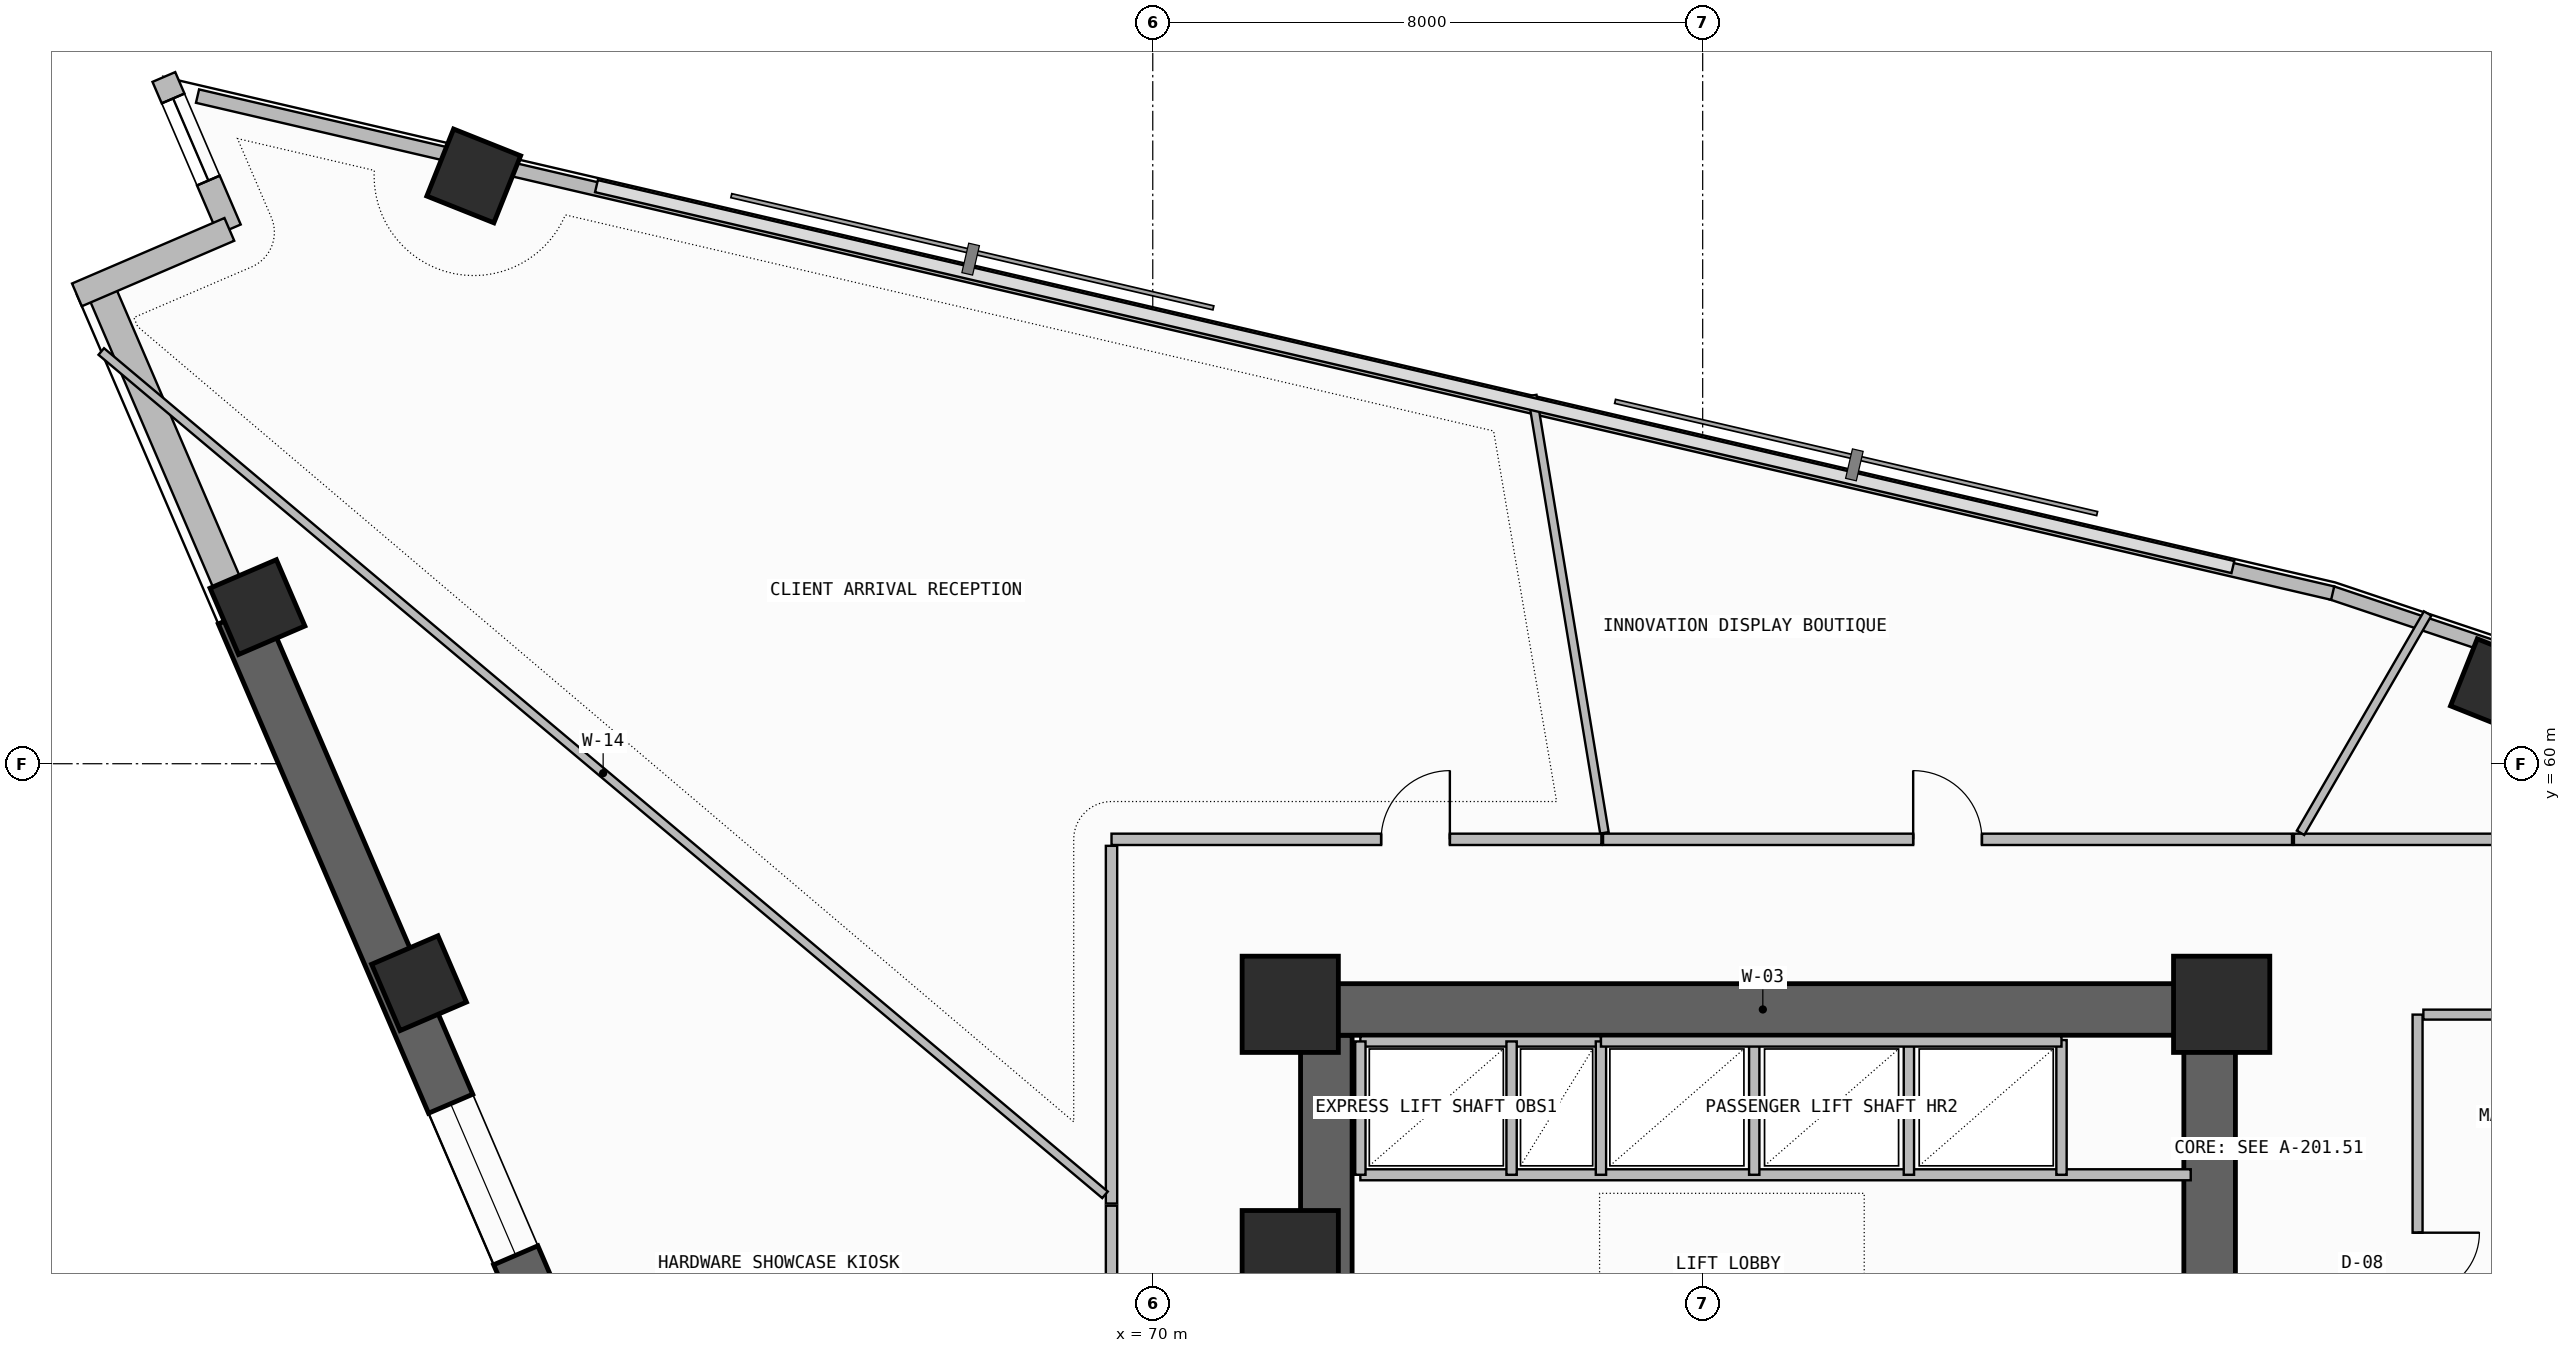
"""IFC4 building model, lengths in metres.
Left out: names, types, materials, properties, quantities, classifications, styles, units other than length and angle.
Written with IfcOpenShell. Run it as: python <this file> out.ifc"""

import sys

from ifc_helpers import new_model, si_unit, direction, frame, frame_2d, origin, origin_2d, place, context, subcontext, project, spatial, rectangle, extrude, element, fill, save


model = new_model("IFC4")
c1 = context("Model", 3, precision=1e-05, world=origin(), true_north=direction((0.0, 1.0)))
c2 = subcontext(c1, "Body", "Model", "MODEL_VIEW")
j1 = project(units=[si_unit("LENGTHUNIT", "METRE"), si_unit("PLANEANGLEUNIT", "RADIAN")], contexts=[c1])
p1 = place(None, origin())
s1 = spatial("IfcSite", under=j1, at=p1, CompositionType="ELEMENT")
p2 = place(p1, origin())
s2 = spatial("IfcBuilding", under=s1, at=p2, CompositionType="ELEMENT")
p3 = place(p2, frame((0.0, 0.0, 182.62)))
s3 = spatial("IfcBuildingStorey", under=s2, at=p3, CompositionType="ELEMENT", Elevation=182.62)
p4 = place(p3, frame((72.525, 43.35, -0.26), z_axis=(0.0, 0.0, 1.0), x_axis=(0.0, 1.0, 0.0)))
e1 = element("IfcWall", 1, at=p4, inside=s3, PredefinedType="SHEAR", context=c2, shape_type="SweptSolid", body=[
    extrude(rectangle(XDim=12.7, YDim=0.75, at=frame_2d((6.35, 0.0))), origin(), (0.0, 0.0, 1.0), 3.52),
])
p5 = place(p4, frame((1.35, 0.0, 0.26)))
e2 = element("IfcOpeningElement", 2, at=p5, cuts=e1, PredefinedType="OPENING", context=c2, shape_type="SweptSolid", body=[
    extrude(rectangle(XDim=1.2, YDim=2.2, at=frame_2d((0.6, 1.1))), frame((0.0, 0.385, 0.0), z_axis=(0.0, -1.0, 0.0), x_axis=(1.0, 0.0, 0.0)), (0.0, 0.0, 1.0), 0.77),
])
p6 = place(p3, frame((72.0, 56.425, -0.26), z_axis=(0.0, 0.0, 1.0), x_axis=(1.0, 0.0, 0.0)))
e3 = element("IfcWall", 3, at=p6, inside=s3, PredefinedType="SHEAR", context=c2, shape_type="SweptSolid", body=[
    extrude(rectangle(XDim=13.75, YDim=0.75, at=frame_2d((6.875, 0.0))), origin(), (0.0, 0.0, 1.0), 3.52),
])
p7 = place(p3, frame((85.375, 47.6, -0.26), z_axis=(0.0, 0.0, 1.0), x_axis=(0.0, 1.0, 0.0)))
e4 = element("IfcWall", 4, at=p7, inside=s3, PredefinedType="SHEAR", context=c2, shape_type="SweptSolid", body=[
    extrude(rectangle(XDim=8.45, YDim=0.75, at=frame_2d((4.225, 0.0))), origin(), (0.0, 0.0, 1.0), 3.52),
])
for number, where, z_axis, x_axis in (
    (5, (72.0, 52.8, 0.0), (0.0, 0.0, 1.0), (1.0, 0.0, 0.0)),
    (6, (72.0, 56.5, 0.0), (0.0, 0.0, 1.0), (1.0, 0.0, 0.0)),
    (7, (85.55, 56.5, 0.0), (0.0, 0.0, 1.0), (1.0, 0.0, 0.0)),
):
    element("IfcColumn", number, at=place(p3, frame(where, z_axis=z_axis, x_axis=x_axis)), inside=s3, PredefinedType="COLUMN", context=c2, shape_type="SweptSolid", body=[
        extrude(rectangle(XDim=1.4, YDim=1.4, at=origin_2d()), origin(), (0.0, 0.0, 1.0), 3.52),
    ])
for number, where, z_axis, x_axis in (
    (8, (89.562, 61.135, 0.0), (0.0, 0.0, 1.0), (0.371, 0.929, 0.0)),
    (9, (60.122, 68.551, 0.0), (0.0, 0.0, 1.0), (0.371, 0.929, 0.0)),
    (10, (56.976, 62.279, 0.0), (0.0, 0.0, 1.0), (-0.395, 0.919, 0.0)),
    (11, (59.326, 56.807, 0.0), (0.0, 0.0, 1.0), (-0.395, 0.919, 0.0)),
):
    element("IfcColumn", number, at=place(p3, frame(where, z_axis=z_axis, x_axis=x_axis)), inside=s3, PredefinedType="COLUMN", context=c2, shape_type="SweptSolid", body=[
        extrude(rectangle(XDim=1.05, YDim=1.05, at=origin_2d()), origin(), (0.0, 0.0, 1.0), 3.52),
    ])
p8 = place(p3, frame((54.671, 66.959, 0.0), z_axis=(0.0, 0.0, 1.0), x_axis=(0.394733507229, -0.918795656428, 0.0)))
e12 = element("IfcWall", 12, at=p8, inside=s3, PredefinedType="SOLIDWALL", context=c2, shape_type="SweptSolid", body=[
    extrude(rectangle(XDim=5.21, YDim=0.42, at=frame_2d((2.605, 0.0))), origin(), (0.0, 0.0, 1.0), 2.645),
])
p9 = place(p3, frame((56.728, 62.172, -0.26), z_axis=(0.0, 0.0, 1.0), x_axis=(0.394736752992, -0.918794261974, 0.0)))
e13 = element("IfcWall", 13, at=p9, inside=s3, PredefinedType="SHEAR", context=c2, shape_type="SweptSolid", body=[
    extrude(rectangle(XDim=19.353, YDim=0.7, at=frame_2d((9.676, 0.0))), origin(), (0.0, 0.0, 1.0), 3.52),
])
p10 = place(p9, frame((7.747, 0.0, 1.2)))
e14 = element("IfcOpeningElement", 14, at=p10, cuts=e13, PredefinedType="OPENING", context=c2, shape_type="SweptSolid", body=[
    extrude(rectangle(XDim=2.4, YDim=0.9, at=frame_2d((1.2, 0.45))), frame((0.0, 0.36, 0.0), z_axis=(0.0, -1.0, 0.0), x_axis=(1.0, 0.0, 0.0)), (0.0, 0.0, 1.0), 0.72),
])
p11 = place(p3, frame((55.614, 69.991, 0.0), z_axis=(0.0, 0.0, 1.0), x_axis=(0.394663989422, -0.918825519592, 0.0)))
e15 = element("IfcWall", 15, at=p11, inside=s3, PredefinedType="SOLIDWALL", context=c2, shape_type="SweptSolid", body=[
    extrude(rectangle(XDim=2.413, YDim=0.36, at=frame_2d((1.207, 0.0))), origin(), (0.0, 0.0, 1.0), 3.26),
])
p12 = place(p11, frame((0.34, 0.0, 0.45)))
e16 = element("IfcOpeningElement", 16, at=p12, cuts=e15, PredefinedType="OPENING", context=c2, shape_type="SweptSolid", body=[
    extrude(rectangle(XDim=1.3, YDim=2.4, at=frame_2d((0.65, 1.2))), frame((0.0, 0.19, 0.0), z_axis=(0.0, -1.0, 0.0), x_axis=(1.0, 0.0, 0.0)), (0.0, 0.0, 1.0), 0.38),
])
p13 = place(p3, frame((56.566, 67.773, 0.0), z_axis=(0.0, 0.0, 1.0), x_axis=(-0.918788830096, -0.394749396062, 0.0)))
e17 = element("IfcWall", 17, at=p13, inside=s3, PredefinedType="SOLIDWALL", context=c2, shape_type="SweptSolid", body=[
    extrude(rectangle(XDim=2.413, YDim=0.36, at=frame_2d((1.207, 0.0))), origin(), (0.0, 0.0, 1.0), 3.26),
])
p14 = place(p3, frame((117.363, 52.344, 0.0), z_axis=(0.0, 0.0, 1.0), x_axis=(-0.94800468727, 0.31825636351, 0.0)))
e18 = element("IfcWall", 18, at=p14, inside=s3, PredefinedType="PARAPET", context=c2, shape_type="SweptSolid", body=[
    extrude(rectangle(XDim=31.869, YDim=0.2, at=frame_2d((15.935, 0.0))), origin(), (0.0, 0.0, 1.0), 1.15),
])
p15 = place(p3, frame((87.165, 62.482, 0.0), z_axis=(0.0, 0.0, 1.0), x_axis=(-0.973958631559, 0.226725790352, 0.0)))
e19 = element("IfcWall", 19, at=p15, inside=s3, PredefinedType="PARAPET", context=c2, shape_type="SweptSolid", body=[
    extrude(rectangle(XDim=27.376, YDim=0.2, at=frame_2d((13.688, 0.0))), origin(), (0.0, 0.0, 1.0), 1.15),
])
p16 = place(p3, frame((59.841, 68.843, 0.0), z_axis=(0.0, 0.0, 1.0), x_axis=(-0.973951848941, 0.226754924851, 0.0)))
e20 = element("IfcWall", 20, at=p16, inside=s3, PredefinedType="PARAPET", context=c2, shape_type="SweptSolid", body=[
    extrude(rectangle(XDim=3.837, YDim=0.2, at=frame_2d((1.918, 0.0))), origin(), (0.0, 0.0, 1.0), 1.15),
])
p17 = place(p3, frame((73.02, 54.02, 0.0), z_axis=(0.0, 0.0, 1.0), x_axis=(1.0, 0.0, 0.0)))
e21 = element("IfcWall", 21, at=p17, inside=s3, PredefinedType="SOLIDWALL", context=c2, shape_type="SweptSolid", body=[
    extrude(rectangle(XDim=12.08, YDim=0.16, at=frame_2d((6.04, 0.0))), origin(), (0.0, 0.0, 1.0), 3.26),
])
p18 = place(p3, frame((73.02, 55.96, 0.0), z_axis=(0.0, 0.0, 1.0), x_axis=(1.0, 0.0, 0.0)))
e22 = element("IfcWall", 22, at=p18, inside=s3, PredefinedType="SOLIDWALL", context=c2, shape_type="SweptSolid", body=[
    extrude(rectangle(XDim=3.5, YDim=0.15, at=frame_2d((1.75, 0.0))), origin(), (0.0, 0.0, 1.0), 3.26),
])
p19 = place(p3, frame((73.02, 54.02, 0.0), z_axis=(0.0, 0.0, 1.0), x_axis=(0.0, 1.0, 0.0)))
e23 = element("IfcWall", 23, at=p19, inside=s3, PredefinedType="PLUMBINGWALL", context=c2, shape_type="SweptSolid", body=[
    extrude(rectangle(XDim=1.94, YDim=0.15, at=frame_2d((0.97, 0.0))), origin(), (0.0, 0.0, 1.0), 3.26),
])
p20 = place(p3, frame((76.52, 54.02, 0.0), z_axis=(0.0, 0.0, 1.0), x_axis=(0.0, 1.0, 0.0)))
e24 = element("IfcWall", 24, at=p20, inside=s3, PredefinedType="SOLIDWALL", context=c2, shape_type="SweptSolid", body=[
    extrude(rectangle(XDim=1.94, YDim=0.15, at=frame_2d((0.97, 0.0))), origin(), (0.0, 0.0, 1.0), 3.26),
])
p21 = place(p3, frame((75.22, 54.02, 0.0), z_axis=(0.0, 0.0, 1.0), x_axis=(0.0, 1.0, 0.0)))
e25 = element("IfcWall", 25, at=p21, inside=s3, PredefinedType="PLUMBINGWALL", context=c2, shape_type="SweptSolid", body=[
    extrude(rectangle(XDim=1.94, YDim=0.15, at=frame_2d((0.97, 0.0))), origin(), (0.0, 0.0, 1.0), 3.26),
])
for number, where, z_axis, x_axis in (
    (26, (78.75, 54.02, 0.0), (0.0, 0.0, 1.0), (0.0, 1.0, 0.0)),
    (27, (81.0, 54.02, 0.0), (0.0, 0.0, 1.0), (0.0, 1.0, 0.0)),
):
    element("IfcWall", number, at=place(p3, frame(where, z_axis=z_axis, x_axis=x_axis)), inside=s3, PredefinedType="PLUMBINGWALL", context=c2, shape_type="SweptSolid", body=[
        extrude(rectangle(XDim=1.96, YDim=0.15, at=frame_2d((0.98, 0.0))), origin(), (0.0, 0.0, 1.0), 3.26),
    ])
p22 = place(p3, frame((83.22, 54.02, 0.0), z_axis=(0.0, 0.0, 1.0), x_axis=(0.0, 1.0, 0.0)))
e28 = element("IfcWall", 28, at=p22, inside=s3, PredefinedType="SOLIDWALL", context=c2, shape_type="SweptSolid", body=[
    extrude(rectangle(XDim=1.96, YDim=0.15, at=frame_2d((0.98, 0.0))), origin(), (0.0, 0.0, 1.0), 3.26),
])
p23 = place(p3, frame((76.52, 55.96, 0.0), z_axis=(0.0, 0.0, 1.0), x_axis=(1.0, 0.0, 0.0)))
e29 = element("IfcWall", 29, at=p23, inside=s3, PredefinedType="SOLIDWALL", context=c2, shape_type="SweptSolid", body=[
    extrude(rectangle(XDim=6.7, YDim=0.15, at=frame_2d((3.35, 0.0))), origin(), (0.0, 0.0, 1.0), 3.26),
])
p24 = place(p3, frame((93.956, 58.9, 0.0), z_axis=(0.0, 0.0, 1.0), x_axis=(-1.0, 0.0, 0.0)))
e30 = element("IfcWall", 30, at=p24, inside=s3, PredefinedType="PARTITIONING", context=c2, shape_type="SweptSolid", body=[
    extrude(rectangle(XDim=7.354, YDim=0.165, at=frame_2d((3.677, 0.0))), origin(), (0.0, 0.0, 1.0), 2.645),
])
p25 = place(p24, frame((1.378, 0.0, 0.0)))
e31 = element("IfcOpeningElement", 31, at=p25, cuts=e30, PredefinedType="OPENING", context=c2, shape_type="SweptSolid", body=[
    extrude(rectangle(XDim=1.6, YDim=2.3, at=frame_2d((0.8, 1.15))), frame((0.0, 0.093, 0.0), z_axis=(0.0, -1.0, 0.0), x_axis=(1.0, 0.0, 0.0)), (0.0, 0.0, 1.0), 0.185),
])
p26 = place(p3, frame((86.698, 58.994, 0.0), z_axis=(0.0, 0.0, 1.0), x_axis=(0.501304979079, 0.865270661672, 0.0)))
e32 = element("IfcWall", 32, at=p26, inside=s3, PredefinedType="PARTITIONING", context=c2, shape_type="SweptSolid", body=[
    extrude(rectangle(XDim=3.689, YDim=0.125, at=frame_2d((1.844, 0.0))), origin(), (0.0, 0.0, 1.0), 3.26),
])
p27 = place(p3, frame((88.4, 49.105, 0.0), z_axis=(0.0, 0.0, 1.0), x_axis=(0.0, 1.0, 0.0)))
e33 = element("IfcWall", 33, at=p27, inside=s3, PredefinedType="PARTITIONING", context=c2, shape_type="SweptSolid", body=[
    extrude(rectangle(XDim=7.245, YDim=0.145, at=frame_2d((3.623, 0.0))), origin(), (0.0, 0.0, 1.0), 2.745),
])
p28 = place(p27, frame((3.173, 0.0, 0.0)))
e34 = element("IfcOpeningElement", 34, at=p28, cuts=e33, PredefinedType="OPENING", context=c2, shape_type="SweptSolid", body=[
    extrude(rectangle(XDim=0.9, YDim=2.1, at=frame_2d((0.45, 1.05))), frame((0.0, 0.083, 0.0), z_axis=(0.0, -1.0, 0.0), x_axis=(1.0, 0.0, 0.0)), (0.0, 0.0, 1.0), 0.165),
])
p29 = place(p3, frame((88.485, 56.35, 0.0), z_axis=(0.0, 0.0, 1.0), x_axis=(1.0, 0.0, 0.0)))
e35 = element("IfcWall", 35, at=p29, inside=s3, PredefinedType="PARTITIONING", context=c2, shape_type="SweptSolid", body=[
    extrude(rectangle(XDim=3.381, YDim=0.145, at=frame_2d((1.69, 0.0))), origin(), (0.0, 0.0, 1.0), 2.745),
])
p30 = place(p3, frame((86.573, 58.9, 0.0), z_axis=(0.0, 0.0, 1.0), x_axis=(-1.0, 0.0, 0.0)))
e36 = element("IfcWall", 36, at=p30, inside=s3, PredefinedType="PARTITIONING", context=c2, shape_type="SweptSolid", body=[
    extrude(rectangle(XDim=10.023, YDim=0.165, at=frame_2d((5.011, 0.0))), origin(), (0.0, 0.0, 1.0), 3.26),
])
p31 = place(p30, frame((4.511, 0.0, 0.0)))
e37 = element("IfcOpeningElement", 37, at=p31, cuts=e36, PredefinedType="OPENING", context=c2, shape_type="SweptSolid", body=[
    extrude(rectangle(XDim=1.0, YDim=2.2, at=frame_2d((0.5, 1.1))), frame((0.0, 0.093, 0.0), z_axis=(0.0, -1.0, 0.0), x_axis=(1.0, 0.0, 0.0)), (0.0, 0.0, 1.0), 0.185),
])
p32 = place(p3, frame((76.571, 58.994, 0.0), z_axis=(0.0, 0.0, 1.0), x_axis=(-0.162839325956, 0.986652600423, 0.0)))
e38 = element("IfcWall", 38, at=p32, inside=s3, PredefinedType="PARTITIONING", context=c2, shape_type="SweptSolid", body=[
    extrude(rectangle(XDim=6.448, YDim=0.125, at=frame_2d((3.224, 0.0))), origin(), (0.0, 0.0, 1.0), 3.26),
])
p33 = place(p3, frame((76.526, 58.9, 0.0), z_axis=(0.0, 0.0, 1.0), x_axis=(-1.0, 0.0, 0.0)))
e39 = element("IfcWall", 39, at=p33, inside=s3, PredefinedType="PARTITIONING", context=c2, shape_type="SweptSolid", body=[
    extrude(rectangle(XDim=7.126, YDim=0.165, at=frame_2d((3.563, 0.0))), origin(), (0.0, 0.0, 1.0), 2.745),
])
p34 = place(p33, frame((2.204, 0.0, 0.0)))
e40 = element("IfcOpeningElement", 40, at=p34, cuts=e39, PredefinedType="OPENING", context=c2, shape_type="SweptSolid", body=[
    extrude(rectangle(XDim=1.0, YDim=2.2, at=frame_2d((0.5, 1.1))), frame((0.0, 0.093, 0.0), z_axis=(0.0, -1.0, 0.0), x_axis=(1.0, 0.0, 0.0)), (0.0, 0.0, 1.0), 0.185),
])
p35 = place(p3, frame((69.4, 58.805, 0.0), z_axis=(0.0, 0.0, 1.0), x_axis=(0.0, -1.0, 0.0)))
e41 = element("IfcWall", 41, at=p35, inside=s3, PredefinedType="PARTITIONING", context=c2, shape_type="SweptSolid", body=[
    extrude(rectangle(XDim=5.204, YDim=0.165, at=frame_2d((2.602, 0.0))), origin(), (0.0, 0.0, 1.0), 2.745),
])
p36 = place(p3, frame((69.305, 53.728, 0.0), z_axis=(0.0, 0.0, 1.0), x_axis=(-0.765630720535, 0.643280343065, 0.0)))
e42 = element("IfcWall", 42, at=p36, inside=s3, PredefinedType="PARTITIONING", context=c2, shape_type="SweptSolid", body=[
    extrude(rectangle(XDim=19.072, YDim=0.125, at=frame_2d((9.536, 0.0))), origin(), (0.0, 0.0, 1.0), 2.645),
])
p37 = place(p3, frame((69.4, 53.57, 0.0), z_axis=(0.0, 0.0, 1.0), x_axis=(0.0, -1.0, 0.0)))
e43 = element("IfcWall", 43, at=p37, inside=s3, PredefinedType="PARTITIONING", context=c2, shape_type="SweptSolid", body=[
    extrude(rectangle(XDim=7.901, YDim=0.165, at=frame_2d((3.95, 0.0))), origin(), (0.0, 0.0, 1.0), 2.745),
])
p38 = place(p37, frame((3.45, 0.0, 0.0)))
e44 = element("IfcOpeningElement", 44, at=p38, cuts=e43, PredefinedType="OPENING", context=c2, shape_type="SweptSolid", body=[
    extrude(rectangle(XDim=1.0, YDim=2.2, at=frame_2d((0.5, 1.1))), frame((0.0, 0.093, 0.0), z_axis=(0.0, -1.0, 0.0), x_axis=(1.0, 0.0, 0.0)), (0.0, 0.0, 1.0), 0.185),
])
p39 = place(p10, origin())
e45 = element("IfcWindow", 45, at=p39, inside=s3, PartitioningType="SINGLE_PANEL", PredefinedType="WINDOW", context=c2, shape_type="SweptSolid", body=[
    extrude(rectangle(XDim=2.4, YDim=0.9, at=frame_2d((1.2, 0.45))), frame((0.0, 0.03, 0.0), z_axis=(0.0, -1.0, 0.0), x_axis=(1.0, 0.0, 0.0)), (0.0, 0.0, 1.0), 0.06),
])
fill(e14, e45)
p40 = place(p12, origin())
e46 = element("IfcWindow", 46, at=p40, inside=s3, PartitioningType="SINGLE_PANEL", PredefinedType="WINDOW", context=c2, shape_type="SweptSolid", body=[
    extrude(rectangle(XDim=1.3, YDim=2.4, at=frame_2d((0.65, 1.2))), frame((0.0, 0.03, 0.0), z_axis=(0.0, -1.0, 0.0), x_axis=(1.0, 0.0, 0.0)), (0.0, 0.0, 1.0), 0.06),
])
fill(e16, e46)
p41 = place(p28, frame((0.9, 0.0, 0.0), z_axis=(0.0, 0.0, 1.0), x_axis=(-1.0, 0.0, 0.0)))
e47 = element("IfcDoor", 47, at=p41, inside=s3, OperationType="SINGLE_SWING_LEFT", PredefinedType="DOOR", context=c2, shape_type="SweptSolid", body=[
    extrude(rectangle(XDim=0.9, YDim=2.1, at=frame_2d((0.45, 1.05))), frame((0.0, 0.025, 0.0), z_axis=(0.0, -1.0, 0.0), x_axis=(1.0, 0.0, 0.0)), (0.0, 0.0, 1.0), 0.05),
])
fill(e34, e47)
p42 = place(p31, frame((1.0, 0.0, 0.0), z_axis=(0.0, 0.0, 1.0), x_axis=(-1.0, 0.0, 0.0)))
e48 = element("IfcDoor", 48, at=p42, inside=s3, OperationType="SINGLE_SWING_LEFT", PredefinedType="DOOR", context=c2, shape_type="SweptSolid", body=[
    extrude(rectangle(XDim=1.0, YDim=2.2, at=frame_2d((0.5, 1.1))), frame((0.0, 0.025, 0.0), z_axis=(0.0, -1.0, 0.0), x_axis=(1.0, 0.0, 0.0)), (0.0, 0.0, 1.0), 0.05),
])
fill(e37, e48)
p43 = place(p34, frame((1.0, 0.0, 0.0), z_axis=(0.0, 0.0, 1.0), x_axis=(-1.0, 0.0, 0.0)))
e49 = element("IfcDoor", 49, at=p43, inside=s3, OperationType="SINGLE_SWING_RIGHT", PredefinedType="DOOR", context=c2, shape_type="SweptSolid", body=[
    extrude(rectangle(XDim=1.0, YDim=2.2, at=frame_2d((0.5, 1.1))), frame((0.0, 0.025, 0.0), z_axis=(0.0, -1.0, 0.0), x_axis=(1.0, 0.0, 0.0)), (0.0, 0.0, 1.0), 0.05),
])
fill(e40, e49)
save(model, sys.argv[1])
